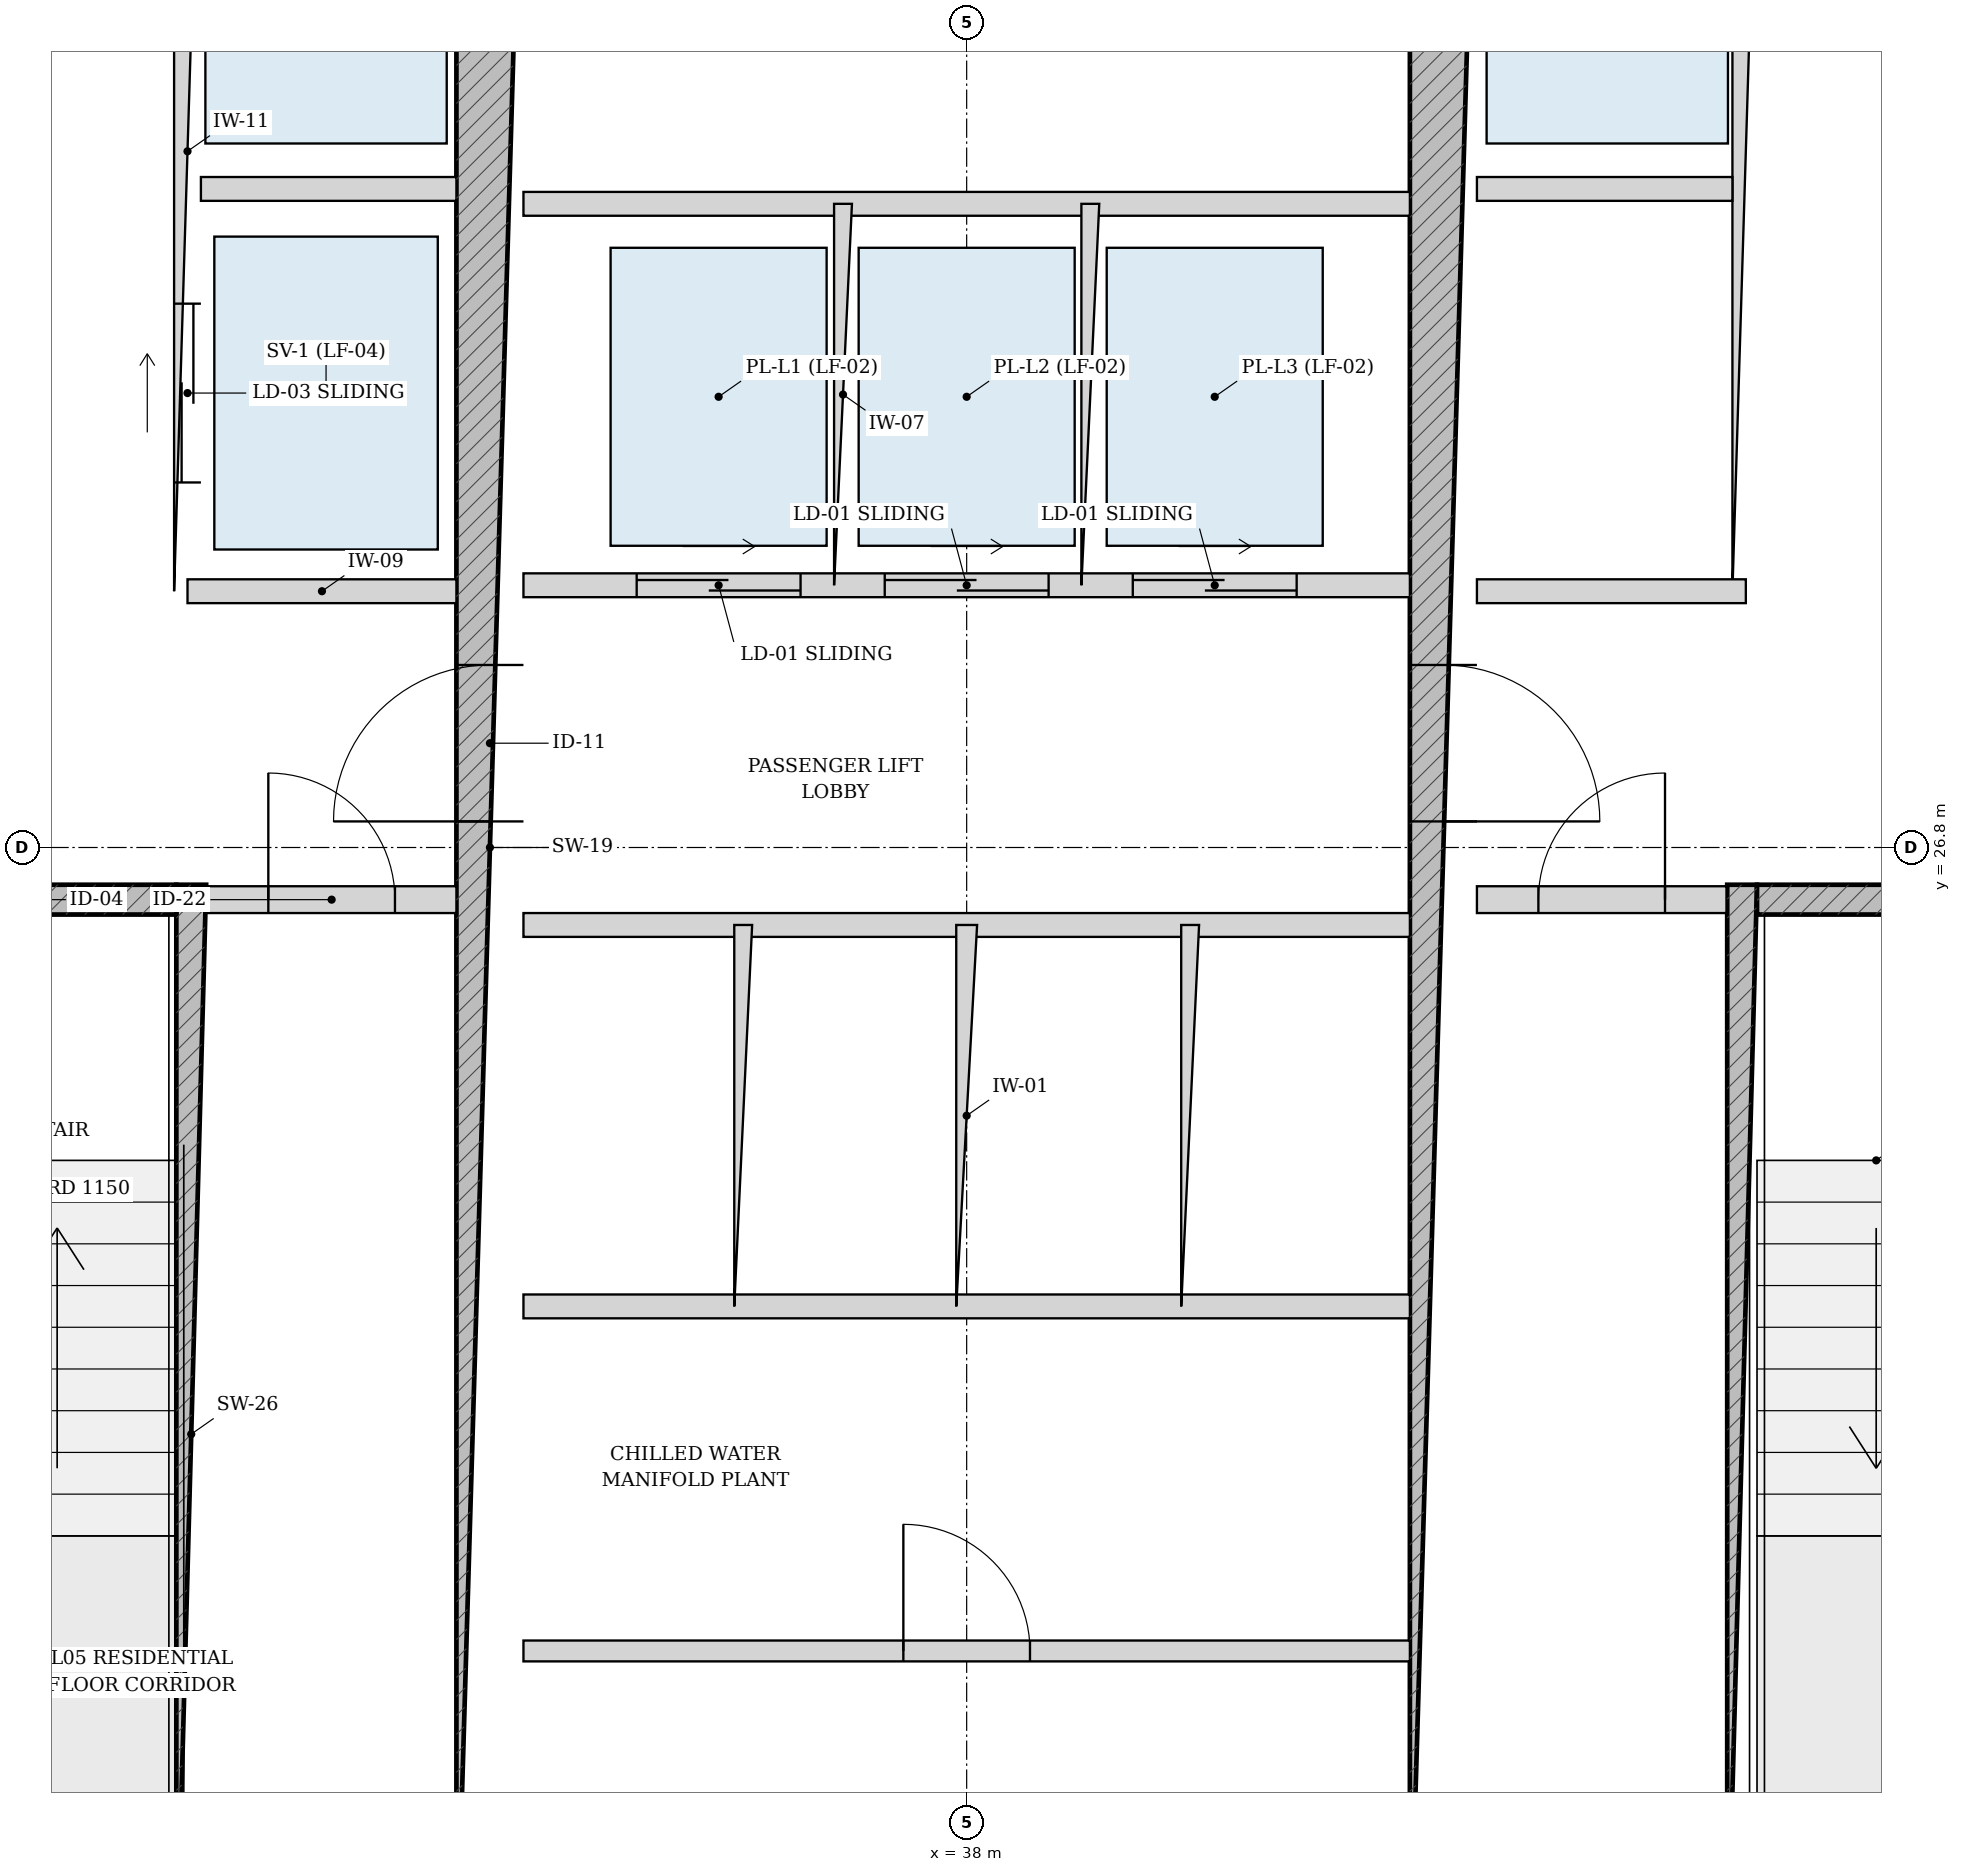
"""IFC4 building model, lengths in metres.
Left out: names, types, materials, properties, quantities, classifications, styles, units other than length and angle.
Written with IfcOpenShell. Run it as: python <this file> out.ifc"""

import sys

from ifc_helpers import new_model, si_unit, direction, frame, frame_2d, origin, place, context, subcontext, project, spatial, rectangle, extrude, source, transform, mapped, element, fill, save


model = new_model("IFC4")
c1 = context("Model", 3, precision=1e-05, world=origin(), true_north=direction((-0.2419218956, 0.970295726276)))
c2 = subcontext(c1, "Body", "Model", "MODEL_VIEW")
j1 = project(units=[si_unit("LENGTHUNIT", "METRE"), si_unit("PLANEANGLEUNIT", "RADIAN")], contexts=[c1])
p1 = place(None, origin())
s1 = spatial("IfcSite", under=j1, at=p1, CompositionType="ELEMENT")
p2 = place(p1, origin())
s2 = spatial("IfcBuilding", under=s1, at=p2, CompositionType="ELEMENT")
p3 = place(p2, frame((0.0, 0.0, 24.0)))
s3 = spatial("IfcBuildingStorey", under=s2, at=p3, CompositionType="ELEMENT", Elevation=24.0)
p4 = place(p3, frame((32.795, 19.175, 0.0), z_axis=(0.0, 0.0, 1.0), x_axis=(0.0, 1.0, 0.0)))
e1 = element("IfcWall", 1, at=p4, inside=s3, PredefinedType="SOLIDWALL", context=c2, shape_type="SweptSolid", body=[
    extrude(rectangle(XDim=7.375, YDim=0.2, at=frame_2d((3.688, 0.0))), origin(), (0.0, 0.0, 1.0), 3.32),
])
p5 = place(p3, frame((29.375, 26.45, 0.0), z_axis=(0.0, 0.0, 1.0), x_axis=(1.0, 0.0, 0.0)))
e2 = element("IfcWall", 2, at=p5, inside=s3, PredefinedType="SOLIDWALL", context=c2, shape_type="SweptSolid", body=[
    extrude(rectangle(XDim=3.32, YDim=0.2, at=frame_2d((1.66, 0.0))), origin(), (0.0, 0.0, 1.0), 3.32),
])
p6 = place(p5, frame((1.185, 0.0, 0.0)))
e3 = element("IfcOpeningElement", 3, at=p6, cuts=e2, PredefinedType="OPENING", context=c2, shape_type="SweptSolid", body=[
    extrude(rectangle(XDim=0.95, YDim=2.15, at=frame_2d((0.475, 1.075))), frame((0.0, 0.11, 0.0), z_axis=(0.0, -1.0, 0.0), x_axis=(1.0, 0.0, 0.0)), (0.0, 0.0, 1.0), 0.22),
])
p7 = place(p3, frame((43.205, 19.175, 0.0), z_axis=(0.0, 0.0, 1.0), x_axis=(0.0, 1.0, 0.0)))
e4 = element("IfcWall", 4, at=p7, inside=s3, PredefinedType="SOLIDWALL", context=c2, shape_type="SweptSolid", body=[
    extrude(rectangle(XDim=7.375, YDim=0.2, at=frame_2d((3.688, 0.0))), origin(), (0.0, 0.0, 1.0), 3.32),
])
p8 = place(p3, frame((43.305, 26.45, 0.0), z_axis=(0.0, 0.0, 1.0), x_axis=(1.0, 0.0, 0.0)))
e5 = element("IfcWall", 5, at=p8, inside=s3, PredefinedType="SOLIDWALL", context=c2, shape_type="SweptSolid", body=[
    extrude(rectangle(XDim=3.32, YDim=0.2, at=frame_2d((1.66, 0.0))), origin(), (0.0, 0.0, 1.0), 3.32),
])
p9 = place(p8, frame((1.185, 0.0, 0.0)))
e6 = element("IfcOpeningElement", 6, at=p9, cuts=e5, PredefinedType="OPENING", context=c2, shape_type="SweptSolid", body=[
    extrude(rectangle(XDim=0.95, YDim=2.15, at=frame_2d((0.475, 1.075))), frame((0.0, 0.11, 0.0), z_axis=(0.0, -1.0, 0.0), x_axis=(1.0, 0.0, 0.0)), (0.0, 0.0, 1.0), 0.22),
])
p10 = place(p3, frame((34.8, 19.175, 0.0), z_axis=(0.0, 0.0, 1.0), x_axis=(0.0, 1.0, 0.0)))
e7 = element("IfcWall", 7, at=p10, inside=s3, PredefinedType="SHEAR", context=c2, shape_type="SweptSolid", body=[
    extrude(rectangle(XDim=15.25, YDim=0.45, at=frame_2d((7.625, 0.0))), origin(), (0.0, 0.0, 1.0), 3.32),
])
p11 = place(p10, frame((7.8, 0.0, 0.0)))
e8 = element("IfcOpeningElement", 8, at=p11, cuts=e7, PredefinedType="OPENING", context=c2, shape_type="SweptSolid", body=[
    extrude(rectangle(XDim=1.05, YDim=2.15, at=frame_2d((0.525, 1.075))), frame((0.0, 0.235, 0.0), z_axis=(0.0, -1.0, 0.0), x_axis=(1.0, 0.0, 0.0)), (0.0, 0.0, 1.0), 0.47),
])
p12 = place(p3, frame((41.2, 19.175, 0.0), z_axis=(0.0, 0.0, 1.0), x_axis=(0.0, 1.0, 0.0)))
e9 = element("IfcWall", 9, at=p12, inside=s3, PredefinedType="SHEAR", context=c2, shape_type="SweptSolid", body=[
    extrude(rectangle(XDim=15.25, YDim=0.45, at=frame_2d((7.625, 0.0))), origin(), (0.0, 0.0, 1.0), 3.32),
])
p13 = place(p12, frame((7.8, 0.0, 0.0)))
e10 = element("IfcOpeningElement", 10, at=p13, cuts=e9, PredefinedType="OPENING", context=c2, shape_type="SweptSolid", body=[
    extrude(rectangle(XDim=1.05, YDim=2.15, at=frame_2d((0.525, 1.075))), frame((0.0, 0.235, 0.0), z_axis=(0.0, -1.0, 0.0), x_axis=(1.0, 0.0, 0.0)), (0.0, 0.0, 1.0), 0.47),
])
p14 = place(p3, frame((32.9, 26.45, 0.0), z_axis=(0.0, 0.0, 1.0), x_axis=(1.0, 0.0, 0.0)))
e11 = element("IfcWall", 11, at=p14, inside=s3, PredefinedType="PARTITIONING", context=c2, shape_type="SweptSolid", body=[
    extrude(rectangle(XDim=1.675, YDim=0.18, at=frame_2d((0.837, 0.0))), origin(), (0.0, 0.0, 1.0), 3.32),
])
p15 = place(p14, frame((0.413, 0.0, 0.0)))
e12 = element("IfcOpeningElement", 12, at=p15, cuts=e11, PredefinedType="OPENING", context=c2, shape_type="SweptSolid", body=[
    extrude(rectangle(XDim=0.85, YDim=2.1, at=frame_2d((0.425, 1.05))), frame((0.0, 0.1, 0.0), z_axis=(0.0, -1.0, 0.0), x_axis=(1.0, 0.0, 0.0)), (0.0, 0.0, 1.0), 0.2),
])
p16 = place(p3, frame((41.425, 26.45, 0.0), z_axis=(0.0, 0.0, 1.0), x_axis=(1.0, 0.0, 0.0)))
e13 = element("IfcWall", 13, at=p16, inside=s3, PredefinedType="PARTITIONING", context=c2, shape_type="SweptSolid", body=[
    extrude(rectangle(XDim=1.675, YDim=0.18, at=frame_2d((0.837, 0.0))), origin(), (0.0, 0.0, 1.0), 3.32),
])
p17 = place(p16, frame((0.413, 0.0, 0.0)))
e14 = element("IfcOpeningElement", 14, at=p17, cuts=e13, PredefinedType="OPENING", context=c2, shape_type="SweptSolid", body=[
    extrude(rectangle(XDim=0.85, YDim=2.1, at=frame_2d((0.425, 1.05))), frame((0.0, 0.1, 0.0), z_axis=(0.0, -1.0, 0.0), x_axis=(1.0, 0.0, 0.0)), (0.0, 0.0, 1.0), 0.2),
])
p18 = place(p3, frame((32.77, 28.52, 0.0), z_axis=(0.0, 0.0, 1.0), x_axis=(0.0, 1.0, 0.0)))
e15 = element("IfcWall", 15, at=p18, inside=s3, PredefinedType="PARTITIONING", context=c2, shape_type="SweptSolid", body=[
    extrude(rectangle(XDim=5.905, YDim=0.18, at=frame_2d((2.953, 0.0))), origin(), (0.0, 0.0, 1.0), 3.32),
])
p19 = place(p18, frame((3.655, 0.0, 0.0)))
e16 = element("IfcOpeningElement", 16, at=p19, cuts=e15, PredefinedType="OPENING", context=c2, shape_type="SweptSolid", body=[
    extrude(rectangle(XDim=1.15, YDim=2.2, at=frame_2d((0.575, 1.1))), frame((0.0, 0.1, 0.0), z_axis=(0.0, -1.0, 0.0), x_axis=(1.0, 0.0, 0.0)), (0.0, 0.0, 1.0), 0.2),
])
p20 = place(p18, frame((0.73, 0.0, 0.0)))
e17 = element("IfcOpeningElement", 17, at=p20, cuts=e15, PredefinedType="OPENING", context=c2, shape_type="SweptSolid", body=[
    extrude(rectangle(XDim=1.2, YDim=2.25, at=frame_2d((0.6, 1.125))), frame((0.0, 0.1, 0.0), z_axis=(0.0, -1.0, 0.0), x_axis=(1.0, 0.0, 0.0)), (0.0, 0.0, 1.0), 0.2),
])
p21 = place(p3, frame((32.86, 31.22, 0.0), z_axis=(0.0, 0.0, 1.0), x_axis=(1.0, 0.0, 0.0)))
e18 = element("IfcWall", 18, at=p21, inside=s3, PredefinedType="PARTITIONING", context=c2, shape_type="SweptSolid", body=[
    extrude(rectangle(XDim=1.715, YDim=0.16, at=frame_2d((0.857, 0.0))), origin(), (0.0, 0.0, 1.0), 3.32),
])
p22 = place(p3, frame((32.77, 28.52, 0.0), z_axis=(0.0, 0.0, 1.0), x_axis=(1.0, 0.0, 0.0)))
e19 = element("IfcWall", 19, at=p22, inside=s3, PredefinedType="PARTITIONING", context=c2, shape_type="SweptSolid", body=[
    extrude(rectangle(XDim=1.805, YDim=0.16, at=frame_2d((0.902, 0.0))), origin(), (0.0, 0.0, 1.0), 3.32),
])
p23 = place(p3, frame((43.23, 28.52, 0.0), z_axis=(0.0, 0.0, 1.0), x_axis=(0.0, 1.0, 0.0)))
e20 = element("IfcWall", 20, at=p23, inside=s3, PredefinedType="PARTITIONING", context=c2, shape_type="SweptSolid", body=[
    extrude(rectangle(XDim=5.905, YDim=0.18, at=frame_2d((2.953, 0.0))), origin(), (0.0, 0.0, 1.0), 3.32),
])
p24 = place(p23, frame((3.655, 0.0, 0.0)))
e21 = element("IfcOpeningElement", 21, at=p24, cuts=e20, PredefinedType="OPENING", context=c2, shape_type="SweptSolid", body=[
    extrude(rectangle(XDim=1.15, YDim=2.2, at=frame_2d((0.575, 1.1))), frame((0.0, 0.1, 0.0), z_axis=(0.0, -1.0, 0.0), x_axis=(1.0, 0.0, 0.0)), (0.0, 0.0, 1.0), 0.2),
])
p25 = place(p3, frame((41.425, 31.22, 0.0), z_axis=(0.0, 0.0, 1.0), x_axis=(1.0, 0.0, 0.0)))
e22 = element("IfcWall", 22, at=p25, inside=s3, PredefinedType="PARTITIONING", context=c2, shape_type="SweptSolid", body=[
    extrude(rectangle(XDim=1.715, YDim=0.16, at=frame_2d((0.857, 0.0))), origin(), (0.0, 0.0, 1.0), 3.32),
])
p26 = place(p3, frame((41.425, 28.52, 0.0), z_axis=(0.0, 0.0, 1.0), x_axis=(1.0, 0.0, 0.0)))
e23 = element("IfcWall", 23, at=p26, inside=s3, PredefinedType="PARTITIONING", context=c2, shape_type="SweptSolid", body=[
    extrude(rectangle(XDim=1.805, YDim=0.16, at=frame_2d((0.902, 0.0))), origin(), (0.0, 0.0, 1.0), 3.32),
])
p27 = place(p3, frame((35.025, 28.56, 0.0), z_axis=(0.0, 0.0, 1.0), x_axis=(1.0, 0.0, 0.0)))
e24 = element("IfcWall", 24, at=p27, inside=s3, PredefinedType="PARTITIONING", context=c2, shape_type="SweptSolid", body=[
    extrude(rectangle(XDim=5.95, YDim=0.16, at=frame_2d((2.975, 0.0))), origin(), (0.0, 0.0, 1.0), 3.32),
])
p28 = place(p27, frame((0.76, 0.0, 0.0)))
e25 = element("IfcOpeningElement", 25, at=p28, cuts=e24, PredefinedType="OPENING", context=c2, shape_type="SweptSolid", body=[
    extrude(rectangle(XDim=1.1, YDim=2.2, at=frame_2d((0.55, 1.1))), frame((0.0, 0.09, 0.0), z_axis=(0.0, -1.0, 0.0), x_axis=(1.0, 0.0, 0.0)), (0.0, 0.0, 1.0), 0.18),
])
p29 = place(p27, frame((2.425, 0.0, 0.0)))
e26 = element("IfcOpeningElement", 26, at=p29, cuts=e24, PredefinedType="OPENING", context=c2, shape_type="SweptSolid", body=[
    extrude(rectangle(XDim=1.1, YDim=2.2, at=frame_2d((0.55, 1.1))), frame((0.0, 0.09, 0.0), z_axis=(0.0, -1.0, 0.0), x_axis=(1.0, 0.0, 0.0)), (0.0, 0.0, 1.0), 0.18),
])
p30 = place(p27, frame((4.09, 0.0, 0.0)))
e27 = element("IfcOpeningElement", 27, at=p30, cuts=e24, PredefinedType="OPENING", context=c2, shape_type="SweptSolid", body=[
    extrude(rectangle(XDim=1.1, YDim=2.2, at=frame_2d((0.55, 1.1))), frame((0.0, 0.09, 0.0), z_axis=(0.0, -1.0, 0.0), x_axis=(1.0, 0.0, 0.0)), (0.0, 0.0, 1.0), 0.18),
])
p31 = place(p3, frame((35.025, 31.12, 0.0), z_axis=(0.0, 0.0, 1.0), x_axis=(1.0, 0.0, 0.0)))
e28 = element("IfcWall", 28, at=p31, inside=s3, PredefinedType="PARTITIONING", context=c2, shape_type="SweptSolid", body=[
    extrude(rectangle(XDim=5.95, YDim=0.16, at=frame_2d((2.975, 0.0))), origin(), (0.0, 0.0, 1.0), 3.32),
])
for number, where, z_axis, x_axis in (
    (29, (37.17, 28.56, 0.0), (0.0, 0.0, 1.0), (0.0, 1.0, 0.0)),
    (30, (38.83, 28.56, 0.0), (0.0, 0.0, 1.0), (0.0, 1.0, 0.0)),
):
    element("IfcWall", number, at=place(p3, frame(where, z_axis=z_axis, x_axis=x_axis)), inside=s3, PredefinedType="PARTITIONING", context=c2, shape_type="SweptSolid", body=[
        extrude(rectangle(XDim=2.56, YDim=0.12, at=frame_2d((1.28, 0.0))), origin(), (0.0, 0.0, 1.0), 3.32),
    ])
for number, where, z_axis, x_axis in (
    (31, (35.025, 26.28, 0.0), (0.0, 0.0, 1.0), (1.0, 0.0, 0.0)),
    (32, (35.025, 23.72, 0.0), (0.0, 0.0, 1.0), (1.0, 0.0, 0.0)),
):
    element("IfcWall", number, at=place(p3, frame(where, z_axis=z_axis, x_axis=x_axis)), inside=s3, PredefinedType="PARTITIONING", context=c2, shape_type="SweptSolid", body=[
        extrude(rectangle(XDim=5.95, YDim=0.16, at=frame_2d((2.975, 0.0))), origin(), (0.0, 0.0, 1.0), 3.32),
    ])
p32 = place(p3, frame((36.5, 23.72, 0.0), z_axis=(0.0, 0.0, 1.0), x_axis=(0.0, 1.0, 0.0)))
e33 = element("IfcWall", 33, at=p32, inside=s3, PredefinedType="PARTITIONING", context=c2, shape_type="SweptSolid", body=[
    extrude(rectangle(XDim=2.56, YDim=0.12, at=frame_2d((1.28, 0.0))), origin(), (0.0, 0.0, 1.0), 3.32),
])
p33 = place(p3, frame((38.0, 23.72, 0.0), z_axis=(0.0, 0.0, 1.0), x_axis=(0.0, 1.0, 0.0)))
e34 = element("IfcWall", 34, at=p33, inside=s3, PredefinedType="PARTITIONING", context=c2, shape_type="SweptSolid", body=[
    extrude(rectangle(XDim=2.56, YDim=0.14, at=frame_2d((1.28, 0.0))), origin(), (0.0, 0.0, 1.0), 3.32),
])
p34 = place(p3, frame((39.5, 23.72, 0.0), z_axis=(0.0, 0.0, 1.0), x_axis=(0.0, 1.0, 0.0)))
e35 = element("IfcWall", 35, at=p34, inside=s3, PredefinedType="PARTITIONING", context=c2, shape_type="SweptSolid", body=[
    extrude(rectangle(XDim=2.56, YDim=0.12, at=frame_2d((1.28, 0.0))), origin(), (0.0, 0.0, 1.0), 3.32),
])
p35 = place(p3, frame((35.025, 21.407, 0.0), z_axis=(0.0, 0.0, 1.0), x_axis=(1.0, 0.0, 0.0)))
e36 = element("IfcWall", 36, at=p35, inside=s3, PredefinedType="PARTITIONING", context=c2, shape_type="SweptSolid", body=[
    extrude(rectangle(XDim=5.95, YDim=0.14, at=frame_2d((2.975, 0.0))), origin(), (0.0, 0.0, 1.0), 3.32),
])
p36 = place(p35, frame((2.55, 0.0, 0.0)))
e37 = element("IfcOpeningElement", 37, at=p36, cuts=e36, PredefinedType="OPENING", context=c2, shape_type="SweptSolid", body=[
    extrude(rectangle(XDim=0.85, YDim=2.1, at=frame_2d((0.425, 1.05))), frame((0.0, 0.08, 0.0), z_axis=(0.0, -1.0, 0.0), x_axis=(1.0, 0.0, 0.0)), (0.0, 0.0, 1.0), 0.16),
])
m1 = source(origin(), c2, "Body", "SweptSolid", [
    extrude(rectangle(XDim=1.05, YDim=2.15, at=frame_2d((0.525, 1.075))), frame((0.0, 0.025, 0.0), z_axis=(0.0, -1.0, 0.0), x_axis=(1.0, 0.0, 0.0)), (0.0, 0.0, 1.0), 0.05),
])
p37 = place(p11, origin())
e38 = element("IfcDoor", 38, at=p37, inside=s3, OperationType="SINGLE_SWING_LEFT", PredefinedType="DOOR", context=c2, shape_type="MappedRepresentation", body=[
    mapped(m1, transform((0.0, 0.0, 0.0), scale=1.0)),
])
fill(e8, e38)
p38 = place(p13, frame((1.05, 0.0, 0.0), z_axis=(0.0, 0.0, 1.0), x_axis=(-1.0, 0.0, 0.0)))
e39 = element("IfcDoor", 39, at=p38, inside=s3, OperationType="SINGLE_SWING_RIGHT", PredefinedType="DOOR", context=c2, shape_type="MappedRepresentation", body=[
    mapped(m1, transform((0.0, 0.0, 0.0), scale=1.0)),
])
fill(e10, e39)
m2 = source(origin(), c2, "Body", "SweptSolid", [
    extrude(rectangle(XDim=0.85, YDim=2.1, at=frame_2d((0.425, 1.05))), frame((0.0, 0.025, 0.0), z_axis=(0.0, -1.0, 0.0), x_axis=(1.0, 0.0, 0.0)), (0.0, 0.0, 1.0), 0.05),
])
p39 = place(p15, origin())
e40 = element("IfcDoor", 40, at=p39, inside=s3, OperationType="SINGLE_SWING_LEFT", PredefinedType="DOOR", context=c2, shape_type="MappedRepresentation", body=[
    mapped(m2, transform((0.0, 0.0, 0.0), scale=1.0)),
])
fill(e12, e40)
p40 = place(p17, origin())
e41 = element("IfcDoor", 41, at=p40, inside=s3, OperationType="SINGLE_SWING_RIGHT", PredefinedType="DOOR", context=c2, shape_type="MappedRepresentation", body=[
    mapped(m2, transform((0.0, 0.0, 0.0), scale=1.0)),
])
fill(e14, e41)
p41 = place(p36, origin())
e42 = element("IfcDoor", 42, at=p41, inside=s3, OperationType="SINGLE_SWING_LEFT", PredefinedType="DOOR", context=c2, shape_type="MappedRepresentation", body=[
    mapped(m2, transform((0.0, 0.0, 0.0), scale=1.0)),
])
fill(e37, e42)
m3 = source(origin(), c2, "Body", "SweptSolid", [
    extrude(rectangle(XDim=1.2, YDim=2.25, at=frame_2d((0.6, 1.125))), frame((0.0, 0.025, 0.0), z_axis=(0.0, -1.0, 0.0), x_axis=(1.0, 0.0, 0.0)), (0.0, 0.0, 1.0), 0.05),
])
p42 = place(p20, origin())
e43 = element("IfcDoor", 43, at=p42, inside=s3, OperationType="DOUBLE_DOOR_SLIDING", PredefinedType="DOOR", context=c2, shape_type="MappedRepresentation", body=[
    mapped(m3, transform((0.0, 0.0, 0.0), scale=1.0)),
])
fill(e17, e43)
m4 = source(origin(), c2, "Body", "SweptSolid", [
    extrude(rectangle(XDim=1.1, YDim=2.2, at=frame_2d((0.55, 1.1))), frame((0.0, 0.025, 0.0), z_axis=(0.0, -1.0, 0.0), x_axis=(1.0, 0.0, 0.0)), (0.0, 0.0, 1.0), 0.05),
])
p43 = place(p28, origin())
e44 = element("IfcDoor", 44, at=p43, inside=s3, OperationType="DOUBLE_DOOR_SLIDING", PredefinedType="DOOR", context=c2, shape_type="MappedRepresentation", body=[
    mapped(m4, transform((0.0, 0.0, 0.0), scale=1.0)),
])
fill(e25, e44)
p44 = place(p29, origin())
e45 = element("IfcDoor", 45, at=p44, inside=s3, OperationType="DOUBLE_DOOR_SLIDING", PredefinedType="DOOR", context=c2, shape_type="MappedRepresentation", body=[
    mapped(m4, transform((0.0, 0.0, 0.0), scale=1.0)),
])
fill(e26, e45)
p45 = place(p30, origin())
e46 = element("IfcDoor", 46, at=p45, inside=s3, OperationType="DOUBLE_DOOR_SLIDING", PredefinedType="DOOR", context=c2, shape_type="MappedRepresentation", body=[
    mapped(m4, transform((0.0, 0.0, 0.0), scale=1.0)),
])
fill(e27, e46)
save(model, sys.argv[1])
